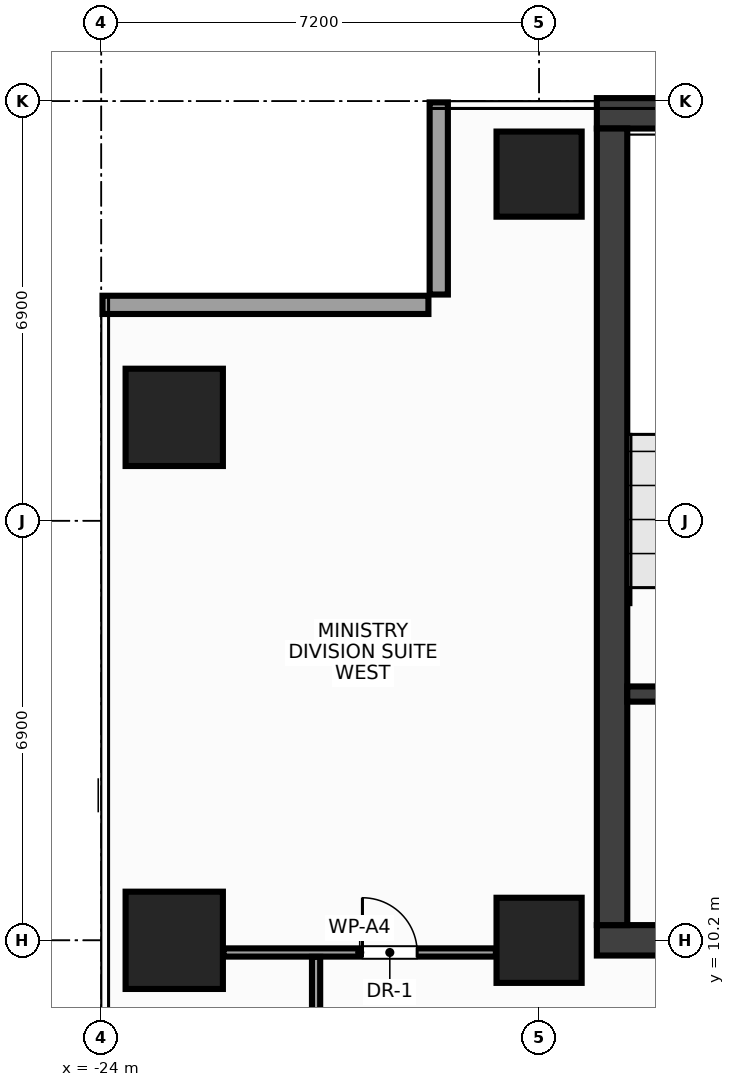
"""IFC4 building model, lengths in metres.
Left out: names, types, materials, properties, quantities, classifications, styles, units other than length and angle.
Written with IfcOpenShell. Run it as: python <this file> out.ifc"""

import sys

from ifc_helpers import new_model, si_unit, direction, frame, frame_2d, origin, origin_2d, place, context, subcontext, project, spatial, rectangle, extrude, source, transform, mapped, element, fill, save


model = new_model("IFC4")
c1 = context("Model", 3, precision=1e-05, world=origin(), true_north=direction((0.0, 1.0)))
c2 = subcontext(c1, "Body", "Model", "MODEL_VIEW")
j1 = project(units=[si_unit("LENGTHUNIT", "METRE"), si_unit("PLANEANGLEUNIT", "RADIAN")], contexts=[c1])
p1 = place(None, origin())
s1 = spatial("IfcSite", under=j1, at=p1, CompositionType="ELEMENT")
p2 = place(p1, origin())
s2 = spatial("IfcBuilding", under=s1, at=p2, CompositionType="ELEMENT")
p3 = place(p2, frame((0.0, 0.0, 200.0)))
s3 = spatial("IfcBuildingStorey", under=s2, at=p3, CompositionType="ELEMENT", Elevation=200.0)
m1 = source(origin(), c2, "Body", "SweptSolid", [
    extrude(rectangle(XDim=31.7, YDim=0.5, at=frame_2d((15.85, 0.0))), origin(), (0.0, 0.0, 1.0), 3.6),
])
p4 = place(p3, frame((-15.85, 23.8, 0.0), z_axis=(0.0, 0.0, 1.0), x_axis=(1.0, 0.0, 0.0)))
e1 = element("IfcWall", 1, at=p4, inside=s3, PredefinedType="SHEAR", context=c2, shape_type="MappedRepresentation", body=[
    mapped(m1, transform((0.0, 0.0, 0.0), x_axis=(1.0, 0.0, 0.0), y_axis=(0.0, 1.0, 0.0), z_axis=(0.0, 0.0, 1.0), scale=1.0)),
])
p5 = place(p3, frame((-15.85, 10.2, 0.0), z_axis=(0.0, 0.0, 1.0), x_axis=(1.0, 0.0, 0.0)))
e2 = element("IfcWall", 2, at=p5, inside=s3, PredefinedType="SHEAR", context=c2, shape_type="MappedRepresentation", body=[
    mapped(m1, transform((0.0, 0.0, 0.0), x_axis=(1.0, 0.0, 0.0), y_axis=(0.0, 1.0, 0.0), z_axis=(0.0, 0.0, 1.0), scale=1.0)),
])
p6 = place(p5, frame((1.7, 0.0, 0.0)))
e3 = element("IfcOpeningElement", 3, at=p6, cuts=e2, PredefinedType="OPENING", context=c2, shape_type="SweptSolid", body=[
    extrude(rectangle(XDim=1.6, YDim=2.15, at=frame_2d((0.8, 1.075))), frame((0.0, 0.262, 0.0), z_axis=(0.0, -1.0, 0.0), x_axis=(1.0, 0.0, 0.0)), (0.0, 0.0, 1.0), 0.524),
])
p7 = place(p5, frame((28.4, 0.0, 0.0)))
e4 = element("IfcOpeningElement", 4, at=p7, cuts=e2, PredefinedType="OPENING", context=c2, shape_type="SweptSolid", body=[
    extrude(rectangle(XDim=1.6, YDim=2.15, at=frame_2d((0.8, 1.075))), frame((0.0, 0.262, 0.0), z_axis=(0.0, -1.0, 0.0), x_axis=(1.0, 0.0, 0.0)), (0.0, 0.0, 1.0), 0.524),
])
p8 = place(p5, frame((15.1, 0.0, 0.0)))
e5 = element("IfcOpeningElement", 5, at=p8, cuts=e2, PredefinedType="OPENING", context=c2, shape_type="SweptSolid", body=[
    extrude(rectangle(XDim=1.5, YDim=2.2, at=frame_2d((0.75, 1.1))), frame((0.0, 0.262, 0.0), z_axis=(0.0, -1.0, 0.0), x_axis=(1.0, 0.0, 0.0)), (0.0, 0.0, 1.0), 0.524),
])
m2 = source(origin(), c2, "Body", "SweptSolid", [
    extrude(rectangle(XDim=13.1, YDim=0.5, at=frame_2d((6.55, 0.0))), origin(), (0.0, 0.0, 1.0), 3.6),
])
p9 = place(p3, frame((-15.6, 10.45, 0.0), z_axis=(0.0, 0.0, 1.0), x_axis=(0.0, 1.0, 0.0)))
e6 = element("IfcWall", 6, at=p9, inside=s3, PredefinedType="SHEAR", context=c2, shape_type="MappedRepresentation", body=[
    mapped(m2, transform((0.0, 0.0, 0.0), x_axis=(1.0, 0.0, 0.0), y_axis=(0.0, 1.0, 0.0), z_axis=(0.0, 0.0, 1.0), scale=1.0)),
])
m3 = source(origin(), c2, "Body", "SweptSolid", [
    extrude(rectangle(XDim=3.705, YDim=0.25, at=frame_2d((1.853, 0.0))), origin(), (0.0, 0.0, 1.0), 3.6),
])
p10 = place(p3, frame((-15.35, 14.25, 0.0), z_axis=(0.0, 0.0, 1.0), x_axis=(1.0, 0.0, 0.0)))
e7 = element("IfcWall", 7, at=p10, inside=s3, PredefinedType="SHEAR", context=c2, shape_type="MappedRepresentation", body=[
    mapped(m3, transform((0.0, 0.0, 0.0), x_axis=(1.0, 0.0, 0.0), y_axis=(0.0, 1.0, 0.0), z_axis=(0.0, 0.0, 1.0), scale=1.0)),
])
p11 = place(p10, frame((0.95, 0.0, 0.0)))
e8 = element("IfcOpeningElement", 8, at=p11, cuts=e7, PredefinedType="OPENING", context=c2, shape_type="SweptSolid", body=[
    extrude(rectangle(XDim=1.6, YDim=2.15, at=frame_2d((0.8, 1.075))), frame((0.0, 0.137, 0.0), z_axis=(0.0, -1.0, 0.0), x_axis=(1.0, 0.0, 0.0)), (0.0, 0.0, 1.0), 0.274),
])
m4 = source(origin(), c2, "Body", "SweptSolid", [
    extrude(rectangle(XDim=1.4, YDim=1.4, at=origin_2d()), origin(), (0.0, 0.0, 1.0), 3.6),
])
for number, where, z_axis, x_axis in (
    (9, (-16.8, 10.2, 0.0), (0.0, 0.0, 1.0), (1.0, 0.0, 0.0)),
    (10, (-16.8, 22.8, 0.0), (0.0, 0.0, 1.0), (1.0, 0.0, 0.0)),
):
    element("IfcColumn", number, at=place(p3, frame(where, z_axis=z_axis, x_axis=x_axis)), inside=s3, PredefinedType="COLUMN", context=c2, shape_type="MappedRepresentation", body=[
        mapped(m4, transform((0.0, 0.0, 0.0), x_axis=(1.0, 0.0, 0.0), y_axis=(0.0, 1.0, 0.0), z_axis=(0.0, 0.0, 1.0), scale=1.0)),
    ])
m5 = source(origin(), c2, "Body", "SweptSolid", [
    extrude(rectangle(XDim=1.6, YDim=1.6, at=origin_2d()), origin(), (0.0, 0.0, 1.0), 3.6),
])
for number, where, z_axis, x_axis in (
    (11, (-22.8, 10.2, 0.0), (0.0, 0.0, 1.0), (1.0, 0.0, 0.0)),
    (12, (-22.8, 18.8, 0.0), (0.0, 0.0, 1.0), (1.0, 0.0, 0.0)),
):
    element("IfcColumn", number, at=place(p3, frame(where, z_axis=z_axis, x_axis=x_axis)), inside=s3, PredefinedType="COLUMN", context=c2, shape_type="MappedRepresentation", body=[
        mapped(m5, transform((0.0, 0.0, 0.0), x_axis=(1.0, 0.0, 0.0), y_axis=(0.0, 1.0, 0.0), z_axis=(0.0, 0.0, 1.0), scale=1.0)),
    ])
m6 = source(origin(), c2, "Body", "SweptSolid", [
    extrude(rectangle(XDim=3.16, YDim=0.3, at=frame_2d((1.58, 0.0))), origin(), (0.0, 0.0, 1.0), 2.76),
])
p12 = place(p3, frame((-18.45, 23.98, 0.0), z_axis=(0.0, 0.0, 1.0), x_axis=(0.0, -1.0, 0.0)))
e13 = element("IfcWall", 13, at=p12, inside=s3, PredefinedType="STANDARD", context=c2, shape_type="MappedRepresentation", body=[
    mapped(m6, transform((0.0, 0.0, 0.0), x_axis=(1.0, 0.0, 0.0), y_axis=(0.0, 1.0, 0.0), z_axis=(0.0, 0.0, 1.0), scale=1.0)),
])
m7 = source(origin(), c2, "Body", "SweptSolid", [
    extrude(rectangle(XDim=5.36, YDim=0.3, at=frame_2d((2.68, 0.0))), origin(), (0.0, 0.0, 1.0), 2.76),
])
p13 = place(p3, frame((-18.62, 20.65, 0.0), z_axis=(0.0, 0.0, 1.0), x_axis=(-1.0, 0.0, 0.0)))
e14 = element("IfcWall", 14, at=p13, inside=s3, PredefinedType="STANDARD", context=c2, shape_type="MappedRepresentation", body=[
    mapped(m7, transform((0.0, 0.0, 0.0), x_axis=(1.0, 0.0, 0.0), y_axis=(0.0, 1.0, 0.0), z_axis=(0.0, 0.0, 1.0), scale=1.0)),
])
m8 = source(origin(), c2, "Body", "SweptSolid", [
    extrude(rectangle(XDim=4.48, YDim=0.135, at=frame_2d((2.24, 0.0))), origin(), (0.0, 0.0, 1.0), 2.915),
])
p14 = place(p3, frame((-21.99, 10.0, 0.0), z_axis=(0.0, 0.0, 1.0), x_axis=(1.0, 0.0, 0.0)))
e15 = element("IfcWall", 15, at=p14, inside=s3, PredefinedType="PARTITIONING", context=c2, shape_type="MappedRepresentation", body=[
    mapped(m8, transform((0.0, 0.0, 0.0), x_axis=(1.0, 0.0, 0.0), y_axis=(0.0, 1.0, 0.0), z_axis=(0.0, 0.0, 1.0), scale=1.0)),
])
p15 = place(p14, frame((2.285, 0.0, 0.0)))
e16 = element("IfcOpeningElement", 16, at=p15, cuts=e15, PredefinedType="OPENING", context=c2, shape_type="SweptSolid", body=[
    extrude(rectangle(XDim=0.9, YDim=2.15, at=frame_2d((0.45, 1.075))), frame((0.0, 0.08, 0.0), z_axis=(0.0, -1.0, 0.0), x_axis=(1.0, 0.0, 0.0)), (0.0, 0.0, 1.0), 0.159),
])
m9 = source(origin(), c2, "Body", "SweptSolid", [
    extrude(rectangle(XDim=2.373, YDim=0.135, at=frame_2d((1.186, 0.0))), origin(), (0.0, 0.0, 1.0), 3.38),
])
p16 = place(p3, frame((-20.468, 7.555, 0.0), z_axis=(0.0, 0.0, 1.0), x_axis=(0.0, 1.0, 0.0)))
e17 = element("IfcWall", 17, at=p16, inside=s3, PredefinedType="PARTITIONING", context=c2, shape_type="MappedRepresentation", body=[
    mapped(m9, transform((0.0, 0.0, 0.0), x_axis=(1.0, 0.0, 0.0), y_axis=(0.0, 1.0, 0.0), z_axis=(0.0, 0.0, 1.0), scale=1.0)),
])
m10 = source(origin(), c2, "Body", "SweptSolid", [
    extrude(rectangle(XDim=0.9, YDim=2.15, at=frame_2d((0.45, 1.075))), frame((0.0, 0.025, 0.0), z_axis=(0.0, -1.0, 0.0), x_axis=(1.0, 0.0, 0.0)), (0.0, 0.0, 1.0), 0.05),
])
p17 = place(p15, origin())
e18 = element("IfcDoor", 18, at=p17, inside=s3, OperationType="SINGLE_SWING_LEFT", PredefinedType="DOOR", context=c2, shape_type="MappedRepresentation", body=[
    mapped(m10, transform((0.0, 0.0, 0.0), x_axis=(1.0, 0.0, 0.0), y_axis=(0.0, 1.0, 0.0), z_axis=(0.0, 0.0, 1.0), scale=1.0)),
])
fill(e16, e18)
save(model, sys.argv[1])
